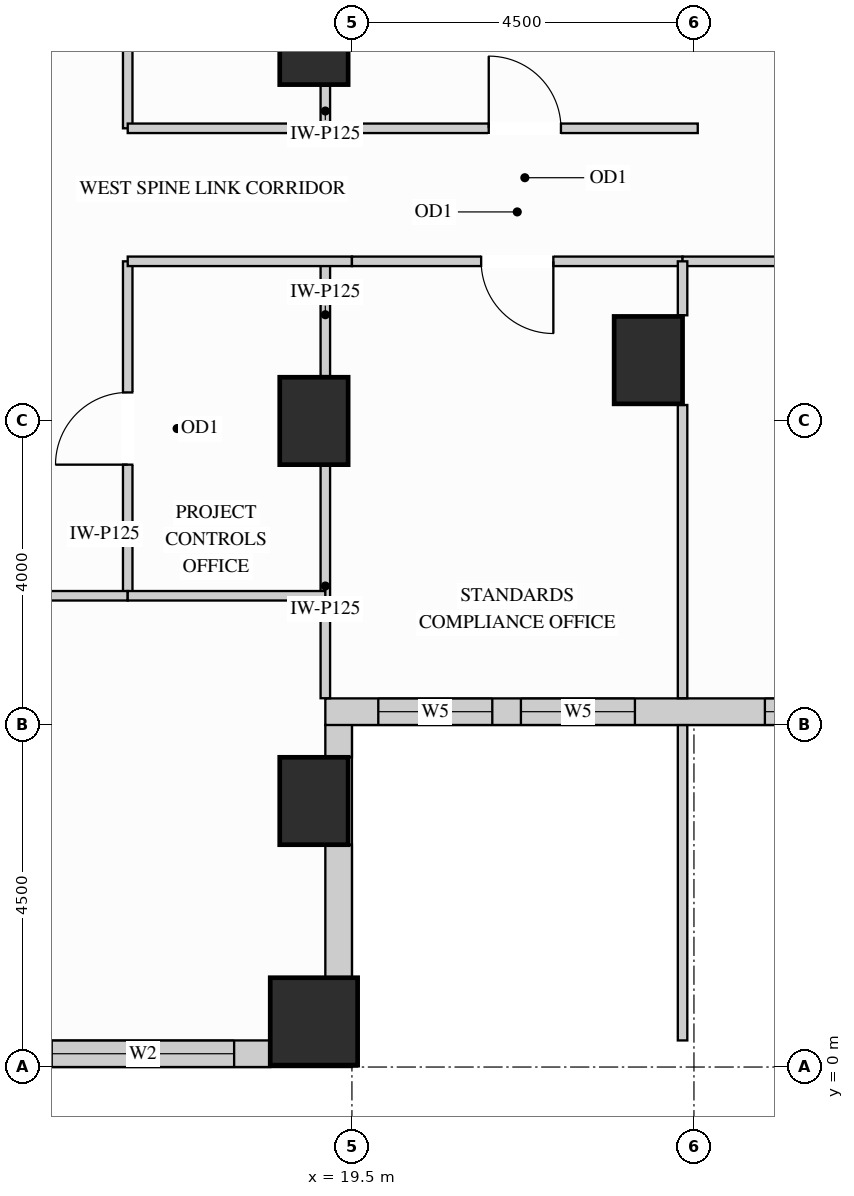
"""IFC4 building model, lengths in metres.
Left out: names, types, materials, properties, quantities, classifications, styles, units other than length and angle.
Written with IfcOpenShell. Run it as: python <this file> out.ifc"""

import sys

from ifc_helpers import new_model, si_unit, direction, frame, frame_2d, origin, origin_2d, place, context, subcontext, project, spatial, rectangle, extrude, source, transform, mapped, element, fill, save


model = new_model("IFC4")
c1 = context("Model", 3, precision=1e-05, world=origin(), true_north=direction((0.0, 1.0)))
c2 = subcontext(c1, "Body", "Model", "MODEL_VIEW")
j1 = project(units=[si_unit("LENGTHUNIT", "METRE"), si_unit("PLANEANGLEUNIT", "RADIAN")], contexts=[c1])
p1 = place(None, origin())
s1 = spatial("IfcSite", under=j1, at=p1, CompositionType="ELEMENT")
p2 = place(p1, origin())
s2 = spatial("IfcBuilding", under=s1, at=p2, CompositionType="ELEMENT")
p3 = place(p2, frame((0.0, 0.0, 84.6)))
s3 = spatial("IfcBuildingStorey", under=s2, at=p3, CompositionType="ELEMENT", Elevation=84.6)
m1 = source(origin(), c2, "Body", "SweptSolid", [
    extrude(rectangle(XDim=0.9, YDim=1.15, at=origin_2d()), origin(), (0.0, 0.0, 1.0), 3.38),
])
for number, where, z_axis, x_axis in (
    (1, (19.0, 13.5, 0.0), (0.0, 0.0, 1.0), (1.0, 0.0, 0.0)),
    (2, (19.0, 3.5, 0.0), (0.0, 0.0, 1.0), (1.0, 0.0, 0.0)),
    (3, (19.0, 8.5, 0.0), (0.0, 0.0, 1.0), (1.0, 0.0, 0.0)),
    (4, (23.4, 9.3, 0.0), (0.0, 0.0, 1.0), (1.0, 0.0, 0.0)),
):
    element("IfcColumn", number, at=place(p3, frame(where, z_axis=z_axis, x_axis=x_axis)), inside=s3, PredefinedType="COLUMN", context=c2, shape_type="MappedRepresentation", body=[
        mapped(m1, transform((0.0, 0.0, 0.0), x_axis=(1.0, 0.0, 0.0), y_axis=(0.0, 1.0, 0.0), z_axis=(0.0, 0.0, 1.0))),
    ])
m2 = source(origin(), c2, "Body", "SweptSolid", [
    extrude(rectangle(XDim=1.15, YDim=1.15, at=origin_2d()), origin(), (0.0, 0.0, 1.0), 3.38),
])
p4 = place(p3, frame((19.0, 0.6, 0.0), z_axis=(0.0, 0.0, 1.0), x_axis=(1.0, 0.0, 0.0)))
e5 = element("IfcColumn", 5, at=p4, inside=s3, PredefinedType="COLUMN", context=c2, shape_type="MappedRepresentation", body=[
    mapped(m2, transform((0.0, 0.0, 0.0), x_axis=(1.0, 0.0, 0.0), y_axis=(0.0, 1.0, 0.0), z_axis=(0.0, 0.0, 1.0))),
])
p5 = place(p3, frame((15.073, 0.175, 0.0), z_axis=(0.0, 0.0, 1.0), x_axis=(1.0, 0.0, 0.0)))
e6 = element("IfcWall", 6, at=p5, inside=s3, PredefinedType="SOLIDWALL", context=c2, shape_type="SweptSolid", body=[
    extrude(rectangle(XDim=3.354, YDim=0.35, at=frame_2d((1.677, 0.0))), origin(), (0.0, 0.0, 1.0), 3.365),
])
p6 = place(p5, frame((0.477, 0.0, 0.78)))
e7 = element("IfcOpeningElement", 7, at=p6, cuts=e6, PredefinedType="OPENING", context=c2, shape_type="SweptSolid", body=[
    extrude(rectangle(XDim=2.4, YDim=2.1, at=frame_2d((1.2, 1.05))), frame((0.0, 0.185, 0.0), z_axis=(0.0, -1.0, 0.0), x_axis=(1.0, 0.0, 0.0)), (0.0, 0.0, 1.0), 0.37),
])
m3 = source(origin(), c2, "Body", "SweptSolid", [
    extrude(rectangle(XDim=1.754, YDim=0.35, at=frame_2d((0.877, 0.0))), origin(), (0.0, 0.0, 1.0), 2.519),
])
p7 = place(p3, frame((19.325, 1.173, 0.0), z_axis=(0.0, 0.0, 1.0), x_axis=(0.0, 1.0, 0.0)))
e8 = element("IfcWall", 8, at=p7, inside=s3, PredefinedType="SOLIDWALL", context=c2, shape_type="MappedRepresentation", body=[
    mapped(m3, transform((0.0, 0.0, 0.0), x_axis=(1.0, 0.0, 0.0), y_axis=(0.0, 1.0, 0.0), z_axis=(0.0, 0.0, 1.0))),
])
m4 = source(origin(), c2, "Body", "SweptSolid", [
    extrude(rectangle(XDim=0.429, YDim=0.35, at=frame_2d((0.214, 0.0))), origin(), (0.0, 0.0, 1.0), 2.677),
])
p8 = place(p3, frame((19.325, 4.073, 0.0), z_axis=(0.0, 0.0, 1.0), x_axis=(0.0, 1.0, 0.0)))
e9 = element("IfcWall", 9, at=p8, inside=s3, PredefinedType="SOLIDWALL", context=c2, shape_type="MappedRepresentation", body=[
    mapped(m4, transform((0.0, 0.0, 0.0), x_axis=(1.0, 0.0, 0.0), y_axis=(0.0, 1.0, 0.0), z_axis=(0.0, 0.0, 1.0))),
])
p9 = place(p3, frame((19.15, 4.675, 0.0), z_axis=(0.0, 0.0, 1.0), x_axis=(1.0, 0.0, 0.0)))
e10 = element("IfcWall", 10, at=p9, inside=s3, PredefinedType="SOLIDWALL", context=c2, shape_type="SweptSolid", body=[
    extrude(rectangle(XDim=15.6, YDim=0.35, at=frame_2d((7.8, 0.0))), origin(), (0.0, 0.0, 1.0), 3.365),
])
p10 = place(p9, frame((0.697, 0.0, 0.78)))
e11 = element("IfcOpeningElement", 11, at=p10, cuts=e10, PredefinedType="OPENING", context=c2, shape_type="SweptSolid", body=[
    extrude(rectangle(XDim=1.5, YDim=2.0, at=frame_2d((0.75, 1.0))), frame((0.0, 0.185, 0.0), z_axis=(0.0, -1.0, 0.0), x_axis=(1.0, 0.0, 0.0)), (0.0, 0.0, 1.0), 0.37),
])
p11 = place(p9, frame((2.573, 0.0, 0.78)))
e12 = element("IfcOpeningElement", 12, at=p11, cuts=e10, PredefinedType="OPENING", context=c2, shape_type="SweptSolid", body=[
    extrude(rectangle(XDim=1.5, YDim=2.0, at=frame_2d((0.75, 1.0))), frame((0.0, 0.185, 0.0), z_axis=(0.0, -1.0, 0.0), x_axis=(1.0, 0.0, 0.0)), (0.0, 0.0, 1.0), 0.37),
])
p12 = place(p9, frame((5.783, 0.0, 0.78)))
e13 = element("IfcOpeningElement", 13, at=p12, cuts=e10, PredefinedType="OPENING", context=c2, shape_type="SweptSolid", body=[
    extrude(rectangle(XDim=1.5, YDim=2.0, at=frame_2d((0.75, 1.0))), frame((0.0, 0.185, 0.0), z_axis=(0.0, -1.0, 0.0), x_axis=(1.0, 0.0, 0.0)), (0.0, 0.0, 1.0), 0.37),
])
p13 = place(p9, frame((8.117, 0.0, 0.78)))
e14 = element("IfcOpeningElement", 14, at=p13, cuts=e10, PredefinedType="OPENING", context=c2, shape_type="SweptSolid", body=[
    extrude(rectangle(XDim=1.5, YDim=2.0, at=frame_2d((0.75, 1.0))), frame((0.0, 0.185, 0.0), z_axis=(0.0, -1.0, 0.0), x_axis=(1.0, 0.0, 0.0)), (0.0, 0.0, 1.0), 0.37),
])
p14 = place(p9, frame((11.393, 0.0, 0.78)))
e15 = element("IfcOpeningElement", 15, at=p14, cuts=e10, PredefinedType="OPENING", context=c2, shape_type="SweptSolid", body=[
    extrude(rectangle(XDim=1.5, YDim=2.0, at=frame_2d((0.75, 1.0))), frame((0.0, 0.185, 0.0), z_axis=(0.0, -1.0, 0.0), x_axis=(1.0, 0.0, 0.0)), (0.0, 0.0, 1.0), 0.37),
])
p15 = place(p9, frame((13.337, 0.0, 0.78)))
e16 = element("IfcOpeningElement", 16, at=p15, cuts=e10, PredefinedType="OPENING", context=c2, shape_type="SweptSolid", body=[
    extrude(rectangle(XDim=1.5, YDim=2.0, at=frame_2d((0.75, 1.0))), frame((0.0, 0.185, 0.0), z_axis=(0.0, -1.0, 0.0), x_axis=(1.0, 0.0, 0.0)), (0.0, 0.0, 1.0), 0.37),
])
m5 = source(origin(), c2, "Body", "SweptSolid", [
    extrude(rectangle(XDim=0.56, YDim=0.125, at=frame_2d((0.28, 0.0))), origin(), (0.0, 0.0, 1.0), 2.677),
])
p16 = place(p3, frame((19.15, 12.35, 0.0), z_axis=(0.0, 0.0, 1.0), x_axis=(0.0, 1.0, 0.0)))
e17 = element("IfcWall", 17, at=p16, inside=s3, PredefinedType="PARTITIONING", context=c2, shape_type="MappedRepresentation", body=[
    mapped(m5, transform((0.0, 0.0, 0.0), x_axis=(1.0, 0.0, 0.0), y_axis=(0.0, 1.0, 0.0), z_axis=(0.0, 0.0, 1.0))),
])
m6 = source(origin(), c2, "Body", "SweptSolid", [
    extrude(rectangle(XDim=3.058, YDim=0.125, at=frame_2d((1.529, 0.0))), origin(), (0.0, 0.0, 1.0), 2.677),
])
p17 = place(p3, frame((19.15, 4.852, 0.0), z_axis=(0.0, 0.0, 1.0), x_axis=(0.0, 1.0, 0.0)))
e18 = element("IfcWall", 18, at=p17, inside=s3, PredefinedType="PARTITIONING", context=c2, shape_type="MappedRepresentation", body=[
    mapped(m6, transform((0.0, 0.0, 0.0), x_axis=(1.0, 0.0, 0.0), y_axis=(0.0, 1.0, 0.0), z_axis=(0.0, 0.0, 1.0))),
])
m7 = source(origin(), c2, "Body", "SweptSolid", [
    extrude(rectangle(XDim=1.51, YDim=0.125, at=frame_2d((0.755, 0.0))), origin(), (0.0, 0.0, 1.0), 2.677),
])
p18 = place(p3, frame((19.15, 9.09, 0.0), z_axis=(0.0, 0.0, 1.0), x_axis=(0.0, 1.0, 0.0)))
e19 = element("IfcWall", 19, at=p18, inside=s3, PredefinedType="PARTITIONING", context=c2, shape_type="MappedRepresentation", body=[
    mapped(m7, transform((0.0, 0.0, 0.0), x_axis=(1.0, 0.0, 0.0), y_axis=(0.0, 1.0, 0.0), z_axis=(0.0, 0.0, 1.0))),
])
p19 = place(p3, frame((16.55, 12.35, 0.0), z_axis=(0.0, 0.0, 1.0), x_axis=(0.0, 1.0, 0.0)))
e20 = element("IfcWall", 20, at=p19, inside=s3, PredefinedType="PARTITIONING", context=c2, shape_type="SweptSolid", body=[
    extrude(rectangle(XDim=3.15, YDim=0.125, at=frame_2d((1.575, 0.0))), origin(), (0.0, 0.0, 1.0), 3.365),
])
p20 = place(p19, frame((1.1, 0.0, 0.0)))
e21 = element("IfcOpeningElement", 21, at=p20, cuts=e20, PredefinedType="OPENING", context=c2, shape_type="SweptSolid", body=[
    extrude(rectangle(XDim=0.95, YDim=2.15, at=frame_2d((0.475, 1.075))), frame((0.0, 0.073, 0.0), z_axis=(0.0, -1.0, 0.0), x_axis=(1.0, 0.0, 0.0)), (0.0, 0.0, 1.0), 0.145),
])
p21 = place(p3, frame((16.55, 6.2, 0.0), z_axis=(0.0, 0.0, 1.0), x_axis=(0.0, 1.0, 0.0)))
e22 = element("IfcWall", 22, at=p21, inside=s3, PredefinedType="PARTITIONING", context=c2, shape_type="SweptSolid", body=[
    extrude(rectangle(XDim=4.4, YDim=0.125, at=frame_2d((2.2, 0.0))), origin(), (0.0, 0.0, 1.0), 3.365),
])
p22 = place(p21, frame((1.725, 0.0, 0.0)))
e23 = element("IfcOpeningElement", 23, at=p22, cuts=e22, PredefinedType="OPENING", context=c2, shape_type="SweptSolid", body=[
    extrude(rectangle(XDim=0.95, YDim=2.15, at=frame_2d((0.475, 1.075))), frame((0.0, 0.073, 0.0), z_axis=(0.0, -1.0, 0.0), x_axis=(1.0, 0.0, 0.0)), (0.0, 0.0, 1.0), 0.145),
])
m8 = source(origin(), c2, "Body", "SweptSolid", [
    extrude(rectangle(XDim=2.95, YDim=0.125, at=frame_2d((1.475, 0.0))), origin(), (0.0, 0.0, 1.0), 3.365),
])
p23 = place(p3, frame((16.55, 12.35, 0.0), z_axis=(0.0, 0.0, 1.0), x_axis=(1.0, 0.0, 0.0)))
e24 = element("IfcWall", 24, at=p23, inside=s3, PredefinedType="PARTITIONING", context=c2, shape_type="MappedRepresentation", body=[
    mapped(m8, transform((0.0, 0.0, 0.0), x_axis=(1.0, 0.0, 0.0), y_axis=(0.0, 1.0, 0.0), z_axis=(0.0, 0.0, 1.0))),
])
p24 = place(p3, frame((19.5, 12.35, 0.0), z_axis=(0.0, 0.0, 1.0), x_axis=(1.0, 0.0, 0.0)))
e25 = element("IfcWall", 25, at=p24, inside=s3, PredefinedType="PARTITIONING", context=c2, shape_type="SweptSolid", body=[
    extrude(rectangle(XDim=4.55, YDim=0.125, at=frame_2d((2.275, 0.0))), origin(), (0.0, 0.0, 1.0), 3.365),
])
p25 = place(p24, frame((1.8, 0.0, 0.0)))
e26 = element("IfcOpeningElement", 26, at=p25, cuts=e25, PredefinedType="OPENING", context=c2, shape_type="SweptSolid", body=[
    extrude(rectangle(XDim=0.95, YDim=2.15, at=frame_2d((0.475, 1.075))), frame((0.0, 0.073, 0.0), z_axis=(0.0, -1.0, 0.0), x_axis=(1.0, 0.0, 0.0)), (0.0, 0.0, 1.0), 0.145),
])
p26 = place(p3, frame((16.55, 10.6, 0.0), z_axis=(0.0, 0.0, 1.0), x_axis=(1.0, 0.0, 0.0)))
e27 = element("IfcWall", 27, at=p26, inside=s3, PredefinedType="PARTITIONING", context=c2, shape_type="MappedRepresentation", body=[
    mapped(m8, transform((0.0, 0.0, 0.0), x_axis=(1.0, 0.0, 0.0), y_axis=(0.0, 1.0, 0.0), z_axis=(0.0, 0.0, 1.0))),
])
p27 = place(p3, frame((19.5, 10.6, 0.0), z_axis=(0.0, 0.0, 1.0), x_axis=(1.0, 0.0, 0.0)))
e28 = element("IfcWall", 28, at=p27, inside=s3, PredefinedType="PARTITIONING", context=c2, shape_type="SweptSolid", body=[
    extrude(rectangle(XDim=4.35, YDim=0.125, at=frame_2d((2.175, 0.0))), origin(), (0.0, 0.0, 1.0), 3.365),
])
p28 = place(p27, frame((1.7, 0.0, 0.0)))
e29 = element("IfcOpeningElement", 29, at=p28, cuts=e28, PredefinedType="OPENING", context=c2, shape_type="SweptSolid", body=[
    extrude(rectangle(XDim=0.95, YDim=2.15, at=frame_2d((0.475, 1.075))), frame((0.0, 0.073, 0.0), z_axis=(0.0, -1.0, 0.0), x_axis=(1.0, 0.0, 0.0)), (0.0, 0.0, 1.0), 0.145),
])
p29 = place(p3, frame((23.85, 10.6, 0.0), z_axis=(0.0, 0.0, 1.0), x_axis=(1.0, 0.0, 0.0)))
e30 = element("IfcWall", 30, at=p29, inside=s3, PredefinedType="PARTITIONING", context=c2, shape_type="SweptSolid", body=[
    extrude(rectangle(XDim=6.0, YDim=0.125, at=frame_2d((3.0, 0.0))), origin(), (0.0, 0.0, 1.0), 3.365),
])
p30 = place(p29, frame((2.525, 0.0, 0.0)))
e31 = element("IfcOpeningElement", 31, at=p30, cuts=e30, PredefinedType="OPENING", context=c2, shape_type="SweptSolid", body=[
    extrude(rectangle(XDim=0.95, YDim=2.15, at=frame_2d((0.475, 1.075))), frame((0.0, 0.073, 0.0), z_axis=(0.0, -1.0, 0.0), x_axis=(1.0, 0.0, 0.0)), (0.0, 0.0, 1.0), 0.145),
])
m9 = source(origin(), c2, "Body", "SweptSolid", [
    extrude(rectangle(XDim=4.148, YDim=0.125, at=frame_2d((2.074, 0.0))), origin(), (0.0, 0.0, 1.0), 3.365),
])
p31 = place(p3, frame((23.85, 0.35, 0.0), z_axis=(0.0, 0.0, 1.0), x_axis=(0.0, 1.0, 0.0)))
e32 = element("IfcWall", 32, at=p31, inside=s3, PredefinedType="PARTITIONING", context=c2, shape_type="MappedRepresentation", body=[
    mapped(m9, transform((0.0, 0.0, 0.0), x_axis=(1.0, 0.0, 0.0), y_axis=(0.0, 1.0, 0.0), z_axis=(0.0, 0.0, 1.0))),
])
m10 = source(origin(), c2, "Body", "SweptSolid", [
    extrude(rectangle(XDim=3.858, YDim=0.125, at=frame_2d((1.929, 0.0))), origin(), (0.0, 0.0, 1.0), 3.365),
])
p32 = place(p3, frame((23.85, 4.852, 0.0), z_axis=(0.0, 0.0, 1.0), x_axis=(0.0, 1.0, 0.0)))
e33 = element("IfcWall", 33, at=p32, inside=s3, PredefinedType="PARTITIONING", context=c2, shape_type="MappedRepresentation", body=[
    mapped(m10, transform((0.0, 0.0, 0.0), x_axis=(1.0, 0.0, 0.0), y_axis=(0.0, 1.0, 0.0), z_axis=(0.0, 0.0, 1.0))),
])
m11 = source(origin(), c2, "Body", "SweptSolid", [
    extrude(rectangle(XDim=0.71, YDim=0.125, at=frame_2d((0.355, 0.0))), origin(), (0.0, 0.0, 1.0), 3.365),
])
p33 = place(p3, frame((23.85, 9.89, 0.0), z_axis=(0.0, 0.0, 1.0), x_axis=(0.0, 1.0, 0.0)))
e34 = element("IfcWall", 34, at=p33, inside=s3, PredefinedType="PARTITIONING", context=c2, shape_type="MappedRepresentation", body=[
    mapped(m11, transform((0.0, 0.0, 0.0), x_axis=(1.0, 0.0, 0.0), y_axis=(0.0, 1.0, 0.0), z_axis=(0.0, 0.0, 1.0))),
])
p34 = place(p3, frame((2.45, 6.2, 0.0), z_axis=(0.0, 0.0, 1.0), x_axis=(1.0, 0.0, 0.0)))
e35 = element("IfcWall", 35, at=p34, inside=s3, PredefinedType="PARTITIONING", context=c2, shape_type="SweptSolid", body=[
    extrude(rectangle(XDim=14.1, YDim=0.125, at=frame_2d((7.05, 0.0))), origin(), (0.0, 0.0, 1.0), 2.828),
])
p35 = place(p34, frame((6.575, 0.0, 0.0)))
e36 = element("IfcOpeningElement", 36, at=p35, cuts=e35, PredefinedType="OPENING", context=c2, shape_type="SweptSolid", body=[
    extrude(rectangle(XDim=0.95, YDim=2.15, at=frame_2d((0.475, 1.075))), frame((0.0, 0.073, 0.0), z_axis=(0.0, -1.0, 0.0), x_axis=(1.0, 0.0, 0.0)), (0.0, 0.0, 1.0), 0.145),
])
m12 = source(origin(), c2, "Body", "SweptSolid", [
    extrude(rectangle(XDim=2.6, YDim=0.125, at=frame_2d((1.3, 0.0))), origin(), (0.0, 0.0, 1.0), 2.828),
])
p36 = place(p3, frame((16.55, 6.2, 0.0), z_axis=(0.0, 0.0, 1.0), x_axis=(1.0, 0.0, 0.0)))
e37 = element("IfcWall", 37, at=p36, inside=s3, PredefinedType="PARTITIONING", context=c2, shape_type="MappedRepresentation", body=[
    mapped(m12, transform((0.0, 0.0, 0.0), x_axis=(1.0, 0.0, 0.0), y_axis=(0.0, 1.0, 0.0), z_axis=(0.0, 0.0, 1.0))),
])
m13 = source(origin(), c2, "Body", "SweptSolid", [
    extrude(rectangle(XDim=0.95, YDim=2.15, at=frame_2d((0.475, 1.075))), frame((0.0, 0.025, 0.0), z_axis=(0.0, -1.0, 0.0), x_axis=(1.0, 0.0, 0.0)), (0.0, 0.0, 1.0), 0.05),
])
p37 = place(p22, origin())
e38 = element("IfcDoor", 38, at=p37, inside=s3, OperationType="SINGLE_SWING_LEFT", PredefinedType="DOOR", context=c2, shape_type="MappedRepresentation", body=[
    mapped(m13, transform((0.0, 0.0, 0.0), x_axis=(1.0, 0.0, 0.0), y_axis=(0.0, 1.0, 0.0), z_axis=(0.0, 0.0, 1.0))),
])
fill(e23, e38)
p38 = place(p25, origin())
e39 = element("IfcDoor", 39, at=p38, inside=s3, OperationType="SINGLE_SWING_LEFT", PredefinedType="DOOR", context=c2, shape_type="MappedRepresentation", body=[
    mapped(m13, transform((0.0, 0.0, 0.0), x_axis=(1.0, 0.0, 0.0), y_axis=(0.0, 1.0, 0.0), z_axis=(0.0, 0.0, 1.0))),
])
fill(e26, e39)
p39 = place(p28, origin())
e40 = element("IfcDoor", 40, at=p39, inside=s3, OperationType="SINGLE_SWING_RIGHT", PredefinedType="DOOR", context=c2, shape_type="MappedRepresentation", body=[
    mapped(m13, transform((0.0, 0.0, 0.0), x_axis=(1.0, 0.0, 0.0), y_axis=(0.0, 1.0, 0.0), z_axis=(0.0, 0.0, 1.0))),
])
fill(e29, e40)
m14 = source(origin(), c2, "Body", "SweptSolid", [
    extrude(rectangle(XDim=2.4, YDim=2.1, at=frame_2d((1.2, 1.05))), frame((0.0, 0.03, 0.0), z_axis=(0.0, -1.0, 0.0), x_axis=(1.0, 0.0, 0.0)), (0.0, 0.0, 1.0), 0.06),
])
p40 = place(p6, origin())
e41 = element("IfcWindow", 41, at=p40, inside=s3, PartitioningType="SINGLE_PANEL", PredefinedType="WINDOW", context=c2, shape_type="MappedRepresentation", body=[
    mapped(m14, transform((0.0, 0.0, 0.0), x_axis=(1.0, 0.0, 0.0), y_axis=(0.0, 1.0, 0.0), z_axis=(0.0, 0.0, 1.0))),
])
fill(e7, e41)
m15 = source(origin(), c2, "Body", "SweptSolid", [
    extrude(rectangle(XDim=1.5, YDim=2.0, at=frame_2d((0.75, 1.0))), frame((0.0, 0.03, 0.0), z_axis=(0.0, -1.0, 0.0), x_axis=(1.0, 0.0, 0.0)), (0.0, 0.0, 1.0), 0.06),
])
p41 = place(p10, origin())
e42 = element("IfcWindow", 42, at=p41, inside=s3, PartitioningType="SINGLE_PANEL", PredefinedType="WINDOW", context=c2, shape_type="MappedRepresentation", body=[
    mapped(m15, transform((0.0, 0.0, 0.0), x_axis=(1.0, 0.0, 0.0), y_axis=(0.0, 1.0, 0.0), z_axis=(0.0, 0.0, 1.0))),
])
fill(e11, e42)
p42 = place(p11, origin())
e43 = element("IfcWindow", 43, at=p42, inside=s3, PartitioningType="SINGLE_PANEL", PredefinedType="WINDOW", context=c2, shape_type="MappedRepresentation", body=[
    mapped(m15, transform((0.0, 0.0, 0.0), x_axis=(1.0, 0.0, 0.0), y_axis=(0.0, 1.0, 0.0), z_axis=(0.0, 0.0, 1.0))),
])
fill(e12, e43)
p43 = place(p12, origin())
e44 = element("IfcWindow", 44, at=p43, inside=s3, PartitioningType="SINGLE_PANEL", PredefinedType="WINDOW", context=c2, shape_type="MappedRepresentation", body=[
    mapped(m15, transform((0.0, 0.0, 0.0), x_axis=(1.0, 0.0, 0.0), y_axis=(0.0, 1.0, 0.0), z_axis=(0.0, 0.0, 1.0))),
])
fill(e13, e44)
save(model, sys.argv[1])
